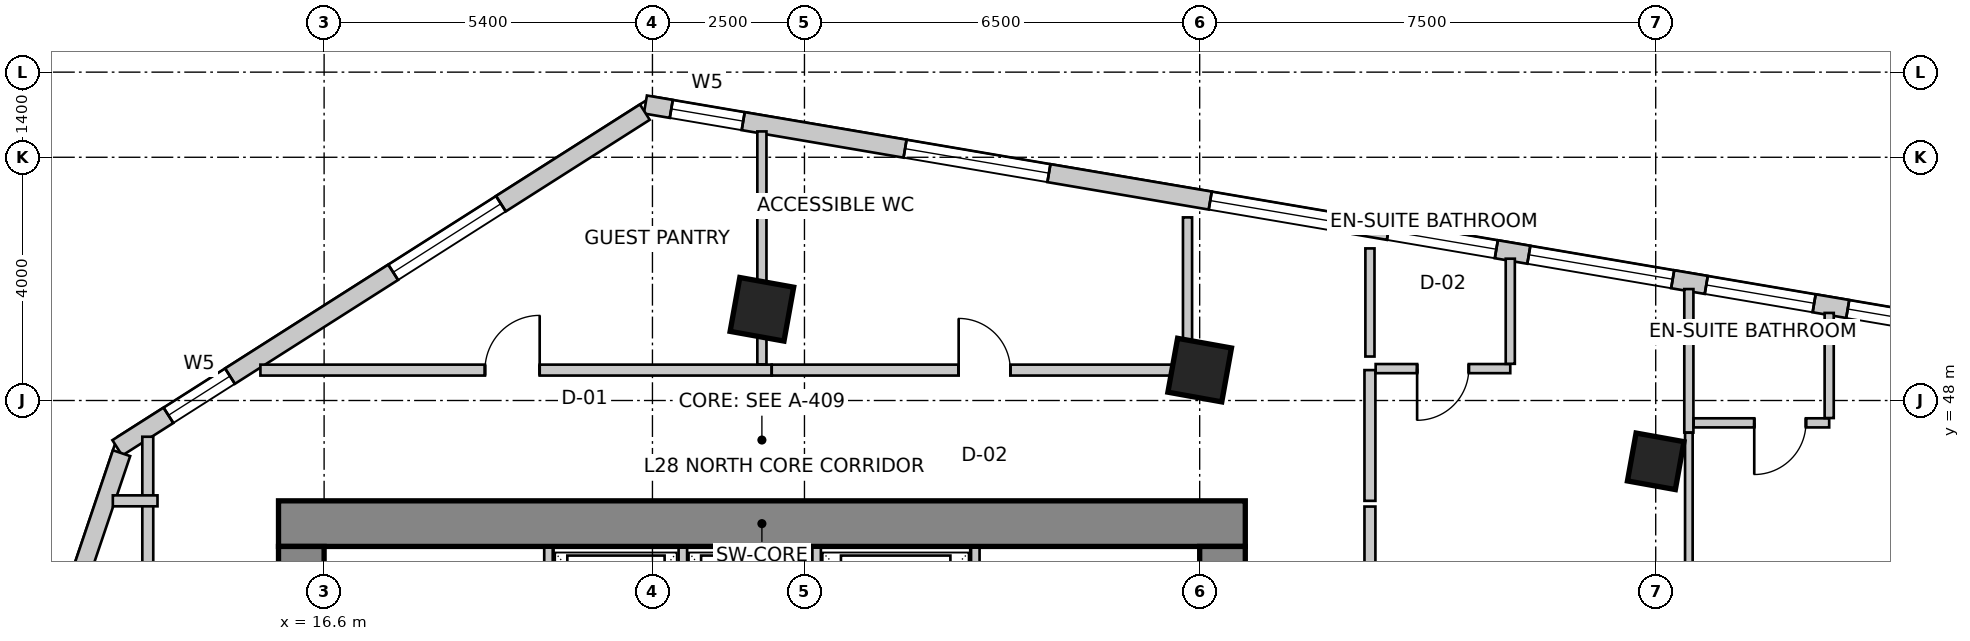
"""IFC4 building model, lengths in metres.
Left out: names, types, materials, properties, quantities, classifications, styles, units other than length and angle.
Written with IfcOpenShell. Run it as: python <this file> out.ifc"""

import sys

from ifc_helpers import new_model, si_unit, direction, frame, frame_2d, origin, origin_2d, place, context, subcontext, project, spatial, rectangle, extrude, source, transform, mapped, element, fill, save


model = new_model("IFC4")
c1 = context("Model", 3, precision=1e-05, world=origin(), true_north=direction((0.0, 1.0)))
c2 = subcontext(c1, "Body", "Model", "MODEL_VIEW")
j1 = project(units=[si_unit("LENGTHUNIT", "METRE"), si_unit("PLANEANGLEUNIT", "RADIAN")], contexts=[c1])
p1 = place(None, origin())
s1 = spatial("IfcSite", under=j1, at=p1, CompositionType="ELEMENT")
p2 = place(p1, origin())
s2 = spatial("IfcBuilding", under=s1, at=p2, CompositionType="ELEMENT")
p3 = place(p2, frame((0.0, 0.0, 117.8)))
s3 = spatial("IfcBuildingStorey", under=s2, at=p3, CompositionType="ELEMENT", Elevation=117.8)
p4 = place(p3, frame((15.85, 45.975, 0.0), z_axis=(0.0, 0.0, 1.0), x_axis=(1.0, 0.0, 0.0)))
e1 = element("IfcWall", 1, at=p4, inside=s3, PredefinedType="SHEAR", context=c2, shape_type="SweptSolid", body=[
    extrude(rectangle(XDim=15.9, YDim=0.75, at=frame_2d((7.95, 0.0))), origin(), (0.0, 0.0, 1.0), 3.6),
])
p5 = place(p3, frame((16.225, 34.2, 0.0), z_axis=(0.0, 0.0, 1.0), x_axis=(0.0, 1.0, 0.0)))
e2 = element("IfcWall", 2, at=p5, inside=s3, PredefinedType="SHEAR", context=c2, shape_type="SweptSolid", body=[
    extrude(rectangle(XDim=11.4, YDim=0.75, at=frame_2d((5.7, 0.0))), origin(), (0.0, 0.0, 1.0), 3.6),
])
m1 = source(origin(), c2, "Body", "SweptSolid", [
    extrude(rectangle(XDim=1.1, YDim=2.15, at=frame_2d((0.55, 1.075))), frame((0.0, 0.385, 0.0), z_axis=(0.0, -1.0, 0.0), x_axis=(1.0, 0.0, 0.0)), (0.0, 0.0, 1.0), 0.77),
])
p6 = place(p5, frame((7.15, 0.0, 0.0)))
e3 = element("IfcOpeningElement", 3, at=p6, cuts=e2, PredefinedType="OPENING", context=c2, shape_type="MappedRepresentation", body=[
    mapped(m1, transform((0.0, 0.0, 0.0), scale=1.0)),
])
p7 = place(p3, frame((31.375, 34.2, 0.0), z_axis=(0.0, 0.0, 1.0), x_axis=(0.0, 1.0, 0.0)))
e4 = element("IfcWall", 4, at=p7, inside=s3, PredefinedType="SHEAR", context=c2, shape_type="SweptSolid", body=[
    extrude(rectangle(XDim=11.4, YDim=0.75, at=frame_2d((5.7, 0.0))), origin(), (0.0, 0.0, 1.0), 3.6),
])
p8 = place(p7, frame((7.35, 0.0, 0.0)))
e5 = element("IfcOpeningElement", 5, at=p8, cuts=e4, PredefinedType="OPENING", context=c2, shape_type="MappedRepresentation", body=[
    mapped(m1, transform((0.0, 0.0, 0.0), scale=1.0)),
])
m2 = source(origin(), c2, "Body", "SweptSolid", [
    extrude(rectangle(XDim=0.9, YDim=0.9, at=origin_2d()), origin(), (0.0, 0.0, 1.0), 3.6),
])
for number, where, z_axis, x_axis in (
    (6, (23.8, 49.5, 0.0), (0.0, 0.0, 1.0), (0.984, -0.177, 0.0)),
    (7, (31.0, 48.5, 0.0), (0.0, 0.0, 1.0), (0.984, -0.177, 0.0)),
):
    element("IfcColumn", number, at=place(p3, frame(where, z_axis=z_axis, x_axis=x_axis)), inside=s3, PredefinedType="COLUMN", context=c2, shape_type="MappedRepresentation", body=[
        mapped(m2, transform((0.0, 0.0, 0.0), scale=1.0)),
    ])
m3 = source(origin(), c2, "Body", "SweptSolid", [
    extrude(rectangle(XDim=0.8, YDim=0.8, at=origin_2d()), origin(), (0.0, 0.0, 1.0), 3.6),
])
p9 = place(p3, frame((38.5, 47.0, 0.0), z_axis=(0.0, 0.0, 1.0), x_axis=(0.984195607969, -0.17708474032, 0.0)))
e8 = element("IfcColumn", 8, at=p9, inside=s3, PredefinedType="COLUMN", context=c2, shape_type="MappedRepresentation", body=[
    mapped(m3, transform((0.0, 0.0, 0.0), scale=1.0)),
])
p10 = place(p3, frame((53.561, 47.48, 0.0), z_axis=(0.0, 0.0, 1.0), x_axis=(-0.985845173895, 0.167658262868, 0.0)))
e9 = element("IfcWall", 9, at=p10, inside=s3, PredefinedType="SOLIDWALL", context=c2, shape_type="SweptSolid", body=[
    extrude(rectangle(XDim=32.132, YDim=0.3, at=frame_2d((16.066, 0.0))), origin(), (0.0, 0.0, 1.0), 3.35),
])
m4 = source(origin(), c2, "Body", "SweptSolid", [
    extrude(rectangle(XDim=2.4, YDim=2.2, at=frame_2d((1.2, 1.1))), frame((0.0, 0.16, 0.0), z_axis=(0.0, -1.0, 0.0), x_axis=(1.0, 0.0, 0.0)), (0.0, 0.0, 1.0), 0.32),
])
p11 = place(p10, frame((0.882, 0.0, 0.85)))
e10 = element("IfcOpeningElement", 10, at=p11, cuts=e9, PredefinedType="OPENING", context=c2, shape_type="MappedRepresentation", body=[
    mapped(m4, transform((0.0, 0.0, 0.0), scale=1.0)),
])
p12 = place(p10, frame((4.354, 0.0, 0.85)))
e11 = element("IfcOpeningElement", 11, at=p12, cuts=e9, PredefinedType="OPENING", context=c2, shape_type="MappedRepresentation", body=[
    mapped(m4, transform((0.0, 0.0, 0.0), scale=1.0)),
])
m5 = source(origin(), c2, "Body", "SweptSolid", [
    extrude(rectangle(XDim=1.8, YDim=2.1, at=frame_2d((0.9, 1.05))), frame((0.0, 0.16, 0.0), z_axis=(0.0, -1.0, 0.0), x_axis=(1.0, 0.0, 0.0)), (0.0, 0.0, 1.0), 0.32),
])
p13 = place(p10, frame((7.314, 0.0, 0.85)))
e12 = element("IfcOpeningElement", 12, at=p13, cuts=e9, PredefinedType="OPENING", context=c2, shape_type="MappedRepresentation", body=[
    mapped(m5, transform((0.0, 0.0, 0.0), scale=1.0)),
])
p14 = place(p10, frame((9.674, 0.0, 0.85)))
e13 = element("IfcOpeningElement", 13, at=p14, cuts=e9, PredefinedType="OPENING", context=c2, shape_type="MappedRepresentation", body=[
    mapped(m4, transform((0.0, 0.0, 0.0), scale=1.0)),
])
p15 = place(p10, frame((12.634, 0.0, 0.85)))
e14 = element("IfcOpeningElement", 14, at=p15, cuts=e9, PredefinedType="OPENING", context=c2, shape_type="MappedRepresentation", body=[
    mapped(m5, transform((0.0, 0.0, 0.0), scale=1.0)),
])
p16 = place(p10, frame((14.994, 0.0, 0.85)))
e15 = element("IfcOpeningElement", 15, at=p16, cuts=e9, PredefinedType="OPENING", context=c2, shape_type="MappedRepresentation", body=[
    mapped(m4, transform((0.0, 0.0, 0.0), scale=1.0)),
])
p17 = place(p10, frame((17.936, 0.0, 0.85)))
e16 = element("IfcOpeningElement", 16, at=p17, cuts=e9, PredefinedType="OPENING", context=c2, shape_type="MappedRepresentation", body=[
    mapped(m5, transform((0.0, 0.0, 0.0), scale=1.0)),
])
p18 = place(p10, frame((20.309, 0.0, 0.85)))
e17 = element("IfcOpeningElement", 17, at=p18, cuts=e9, PredefinedType="OPENING", context=c2, shape_type="MappedRepresentation", body=[
    mapped(m4, transform((0.0, 0.0, 0.0), scale=1.0)),
])
p19 = place(p10, frame((25.4, 0.0, 0.85)))
e18 = element("IfcOpeningElement", 18, at=p19, cuts=e9, PredefinedType="OPENING", context=c2, shape_type="MappedRepresentation", body=[
    mapped(m4, transform((0.0, 0.0, 0.0), scale=1.0)),
])
m6 = source(origin(), c2, "Body", "SweptSolid", [
    extrude(rectangle(XDim=1.2, YDim=1.6, at=frame_2d((0.6, 0.8))), frame((0.0, 0.16, 0.0), z_axis=(0.0, -1.0, 0.0), x_axis=(1.0, 0.0, 0.0)), (0.0, 0.0, 1.0), 0.32),
])
p20 = place(p10, frame((30.5, 0.0, 0.85)))
e19 = element("IfcOpeningElement", 19, at=p20, cuts=e9, PredefinedType="OPENING", context=c2, shape_type="MappedRepresentation", body=[
    mapped(m6, transform((0.0, 0.0, 0.0), scale=1.0)),
])
p21 = place(p3, frame((21.875, 52.742, 0.0), z_axis=(0.0, 0.0, 1.0), x_axis=(-0.843662465249, -0.536873956092, 0.0)))
e20 = element("IfcWall", 20, at=p21, inside=s3, PredefinedType="SOLIDWALL", context=c2, shape_type="SweptSolid", body=[
    extrude(rectangle(XDim=10.284, YDim=0.3, at=frame_2d((5.142, 0.0))), origin(), (0.0, 0.0, 1.0), 3.35),
])
m7 = source(origin(), c2, "Body", "SweptSolid", [
    extrude(rectangle(XDim=2.1, YDim=2.0, at=frame_2d((1.05, 1.0))), frame((0.0, 0.16, 0.0), z_axis=(0.0, -1.0, 0.0), x_axis=(1.0, 0.0, 0.0)), (0.0, 0.0, 1.0), 0.32),
])
p22 = place(p21, frame((2.806, 0.0, 0.85)))
e21 = element("IfcOpeningElement", 21, at=p22, cuts=e20, PredefinedType="OPENING", context=c2, shape_type="MappedRepresentation", body=[
    mapped(m7, transform((0.0, 0.0, 0.0), scale=1.0)),
])
p23 = place(p21, frame((8.087, 0.0, 0.85)))
e22 = element("IfcOpeningElement", 22, at=p23, cuts=e20, PredefinedType="OPENING", context=c2, shape_type="MappedRepresentation", body=[
    mapped(m6, transform((0.0, 0.0, 0.0), scale=1.0)),
])
p24 = place(p3, frame((13.269, 47.134, 0.0), z_axis=(0.0, 0.0, 1.0), x_axis=(-0.319929596295, -0.947441319246, 0.0)))
e23 = element("IfcWall", 23, at=p24, inside=s3, PredefinedType="SOLIDWALL", context=c2, shape_type="SweptSolid", body=[
    extrude(rectangle(XDim=16.134, YDim=0.3, at=frame_2d((8.067, 0.0))), origin(), (0.0, 0.0, 1.0), 3.35),
])
p25 = place(p24, frame((2.276, 0.0, 0.85)))
e24 = element("IfcOpeningElement", 24, at=p25, cuts=e23, PredefinedType="OPENING", context=c2, shape_type="MappedRepresentation", body=[
    mapped(m4, transform((0.0, 0.0, 0.0), scale=1.0)),
])
p26 = place(p24, frame((7.361, 0.0, 0.85)))
e25 = element("IfcOpeningElement", 25, at=p26, cuts=e23, PredefinedType="OPENING", context=c2, shape_type="MappedRepresentation", body=[
    mapped(m7, transform((0.0, 0.0, 0.0), scale=1.0)),
])
p27 = place(p24, frame((12.147, 0.0, 0.85)))
e26 = element("IfcOpeningElement", 26, at=p27, cuts=e23, PredefinedType="OPENING", context=c2, shape_type="MappedRepresentation", body=[
    mapped(m4, transform((0.0, 0.0, 0.0), scale=1.0)),
])
for number, where, z_axis, x_axis in (
    (27, (20.29, 43.28, 0.0), (0.0, 0.0, 1.0), (0.0, 1.0, 0.0)),
    (28, (27.31, 43.28, 0.0), (0.0, 0.0, 1.0), (0.0, 1.0, 0.0)),
):
    element("IfcWall", number, at=place(p3, frame(where, z_axis=z_axis, x_axis=x_axis)), inside=s3, PredefinedType="SOLIDWALL", context=c2, shape_type="SweptSolid", body=[
        extrude(rectangle(XDim=2.3, YDim=0.14, at=frame_2d((1.15, 0.0))), origin(), (0.0, 0.0, 1.0), 3.35),
    ])
for number, where, z_axis, x_axis in (
    (29, (22.5, 43.02, 0.0), (0.0, 0.0, 1.0), (0.0, 1.0, 0.0)),
    (30, (24.7, 43.02, 0.0), (0.0, 0.0, 1.0), (0.0, 1.0, 0.0)),
):
    element("IfcWall", number, at=place(p3, frame(where, z_axis=z_axis, x_axis=x_axis)), inside=s3, PredefinedType="SOLIDWALL", context=c2, shape_type="SweptSolid", body=[
        extrude(rectangle(XDim=2.56, YDim=0.14, at=frame_2d((1.28, 0.0))), origin(), (0.0, 0.0, 1.0), 3.35),
    ])
p28 = place(p3, frame((13.7, 33.544, 0.0), z_axis=(0.0, 0.0, 1.0), x_axis=(0.0, 1.0, 0.0)))
e31 = element("IfcWall", 31, at=p28, inside=s3, PredefinedType="PARTITIONING", context=c2, shape_type="SweptSolid", body=[
    extrude(rectangle(XDim=13.86, YDim=0.18, at=frame_2d((6.93, 0.0))), origin(), (0.0, 0.0, 1.0), 2.492),
])
m8 = source(origin(), c2, "Body", "SweptSolid", [
    extrude(rectangle(XDim=0.9, YDim=2.15, at=frame_2d((0.45, 1.075))), frame((0.0, 0.1, 0.0), z_axis=(0.0, -1.0, 0.0), x_axis=(1.0, 0.0, 0.0)), (0.0, 0.0, 1.0), 0.2),
])
p29 = place(p28, frame((4.253, 0.0, 0.0)))
e32 = element("IfcOpeningElement", 32, at=p29, cuts=e31, PredefinedType="OPENING", context=c2, shape_type="MappedRepresentation", body=[
    mapped(m8, transform((0.0, 0.0, 0.0), scale=1.0)),
])
p30 = place(p3, frame((13.86, 46.35, 0.0), z_axis=(0.0, 0.0, 1.0), x_axis=(-1.0, 0.0, 0.0)))
e33 = element("IfcWall", 33, at=p30, inside=s3, PredefinedType="PARTITIONING", context=c2, shape_type="SweptSolid", body=[
    extrude(rectangle(XDim=0.735, YDim=0.18, at=frame_2d((0.367, 0.0))), origin(), (0.0, 0.0, 1.0), 3.35),
])
p31 = place(p3, frame((15.552, 48.5, 0.0), z_axis=(0.0, 0.0, 1.0), x_axis=(1.0, 0.0, 0.0)))
e34 = element("IfcWall", 34, at=p31, inside=s3, PredefinedType="PARTITIONING", context=c2, shape_type="SweptSolid", body=[
    extrude(rectangle(XDim=8.407, YDim=0.18, at=frame_2d((4.204, 0.0))), origin(), (0.0, 0.0, 1.0), 3.019),
])
p32 = place(p31, frame((3.693, 0.0, 0.0)))
e35 = element("IfcOpeningElement", 35, at=p32, cuts=e34, PredefinedType="OPENING", context=c2, shape_type="MappedRepresentation", body=[
    mapped(m8, transform((0.0, 0.0, 0.0), scale=1.0)),
])
p33 = place(p3, frame((23.962, 48.5, 0.0), z_axis=(0.0, 0.0, 1.0), x_axis=(1.0, 0.0, 0.0)))
e36 = element("IfcWall", 36, at=p33, inside=s3, PredefinedType="PARTITIONING", context=c2, shape_type="SweptSolid", body=[
    extrude(rectangle(XDim=6.998, YDim=0.18, at=frame_2d((3.499, 0.0))), origin(), (0.0, 0.0, 1.0), 2.492),
])
m9 = source(origin(), c2, "Body", "SweptSolid", [
    extrude(rectangle(XDim=0.85, YDim=2.15, at=frame_2d((0.425, 1.075))), frame((0.0, 0.1, 0.0), z_axis=(0.0, -1.0, 0.0), x_axis=(1.0, 0.0, 0.0)), (0.0, 0.0, 1.0), 0.2),
])
p34 = place(p33, frame((3.074, 0.0, 0.0)))
e37 = element("IfcOpeningElement", 37, at=p34, cuts=e36, PredefinedType="OPENING", context=c2, shape_type="MappedRepresentation", body=[
    mapped(m9, transform((0.0, 0.0, 0.0), scale=1.0)),
])
p35 = place(p3, frame((33.8, 48.5, 0.0), z_axis=(0.0, 0.0, 1.0), x_axis=(0.0, -1.0, 0.0)))
e38 = element("IfcWall", 38, at=p35, inside=s3, PredefinedType="PARTITIONING", context=c2, shape_type="SweptSolid", body=[
    extrude(rectangle(XDim=2.15, YDim=0.18, at=frame_2d((1.075, 0.0))), origin(), (0.0, 0.0, 1.0), 2.492),
])
p36 = place(p3, frame((33.8, 46.256, 0.0), z_axis=(0.0, 0.0, 1.0), x_axis=(0.0, -1.0, 0.0)))
e39 = element("IfcWall", 39, at=p36, inside=s3, PredefinedType="PARTITIONING", context=c2, shape_type="SweptSolid", body=[
    extrude(rectangle(XDim=8.416, YDim=0.18, at=frame_2d((4.208, 0.0))), origin(), (0.0, 0.0, 1.0), 2.879),
])
p37 = place(p3, frame((23.8, 52.425, 0.0), z_axis=(0.0, 0.0, 1.0), x_axis=(0.0, -1.0, 0.0)))
e40 = element("IfcWall", 40, at=p37, inside=s3, PredefinedType="PARTITIONING", context=c2, shape_type="SweptSolid", body=[
    extrude(rectangle(XDim=3.831, YDim=0.15, at=frame_2d((1.916, 0.0))), origin(), (0.0, 0.0, 1.0), 2.492),
])
p38 = place(p3, frame((36.108, 48.524, 0.0), z_axis=(0.0, 0.0, 1.0), x_axis=(-1.0, 0.0, 0.0)))
e41 = element("IfcWall", 41, at=p38, inside=s3, PredefinedType="PARTITIONING", context=c2, shape_type="SweptSolid", body=[
    extrude(rectangle(XDim=2.214, YDim=0.15, at=frame_2d((1.107, 0.0))), origin(), (0.0, 0.0, 1.0), 3.35),
])
m10 = source(origin(), c2, "Body", "SweptSolid", [
    extrude(rectangle(XDim=0.85, YDim=2.15, at=frame_2d((0.425, 1.075))), frame((0.0, 0.085, 0.0), z_axis=(0.0, -1.0, 0.0), x_axis=(1.0, 0.0, 0.0)), (0.0, 0.0, 1.0), 0.17),
])
p39 = place(p38, frame((0.682, 0.0, 0.0)))
e42 = element("IfcOpeningElement", 42, at=p39, cuts=e41, PredefinedType="OPENING", context=c2, shape_type="MappedRepresentation", body=[
    mapped(m10, transform((0.0, 0.0, 0.0), scale=1.0)),
])
p40 = place(p3, frame((36.108, 50.332, 0.0), z_axis=(0.0, 0.0, 1.0), x_axis=(0.0, -1.0, 0.0)))
e43 = element("IfcWall", 43, at=p40, inside=s3, PredefinedType="PARTITIONING", context=c2, shape_type="SweptSolid", body=[
    extrude(rectangle(XDim=1.728, YDim=0.15, at=frame_2d((0.864, 0.0))), origin(), (0.0, 0.0, 1.0), 3.35),
])
p41 = place(p3, frame((39.045, 49.833, 0.0), z_axis=(0.0, 0.0, 1.0), x_axis=(0.0, -1.0, 0.0)))
e44 = element("IfcWall", 44, at=p41, inside=s3, PredefinedType="PARTITIONING", context=c2, shape_type="SweptSolid", body=[
    extrude(rectangle(XDim=2.36, YDim=0.15, at=frame_2d((1.18, 0.0))), origin(), (0.0, 0.0, 1.0), 3.35),
])
p42 = place(p3, frame((39.045, 47.47, 0.0), z_axis=(0.0, 0.0, 1.0), x_axis=(0.0, -1.0, 0.0)))
e45 = element("IfcWall", 45, at=p42, inside=s3, PredefinedType="PARTITIONING", context=c2, shape_type="SweptSolid", body=[
    extrude(rectangle(XDim=9.376, YDim=0.125, at=frame_2d((4.688, 0.0))), origin(), (0.0, 0.0, 1.0), 2.492),
])
p43 = place(p3, frame((41.353, 47.633, 0.0), z_axis=(0.0, 0.0, 1.0), x_axis=(-1.0, 0.0, 0.0)))
e46 = element("IfcWall", 46, at=p43, inside=s3, PredefinedType="PARTITIONING", context=c2, shape_type="SweptSolid", body=[
    extrude(rectangle(XDim=2.229, YDim=0.15, at=frame_2d((1.115, 0.0))), origin(), (0.0, 0.0, 1.0), 3.35),
])
p44 = place(p43, frame((0.382, 0.0, 0.0)))
e47 = element("IfcOpeningElement", 47, at=p44, cuts=e46, PredefinedType="OPENING", context=c2, shape_type="MappedRepresentation", body=[
    mapped(m10, transform((0.0, 0.0, 0.0), scale=1.0)),
])
p45 = place(p3, frame((41.353, 49.44, 0.0), z_axis=(0.0, 0.0, 1.0), x_axis=(0.0, -1.0, 0.0)))
e48 = element("IfcWall", 48, at=p45, inside=s3, PredefinedType="PARTITIONING", context=c2, shape_type="SweptSolid", body=[
    extrude(rectangle(XDim=1.729, YDim=0.15, at=frame_2d((0.864, 0.0))), origin(), (0.0, 0.0, 1.0), 3.35),
])
p46 = place(p3, frame((30.8, 51.011, 0.0), z_axis=(0.0, 0.0, 1.0), x_axis=(0.0, -1.0, 0.0)))
e49 = element("IfcWall", 49, at=p46, inside=s3, PredefinedType="PARTITIONING", context=c2, shape_type="SweptSolid", body=[
    extrude(rectangle(XDim=2.292, YDim=0.15, at=frame_2d((1.146, 0.0))), origin(), (0.0, 0.0, 1.0), 3.35),
])
p47 = place(p3, frame((33.8, 48.723, 0.0), z_axis=(0.0, 0.0, 1.0), x_axis=(0.0, 1.0, 0.0)))
e50 = element("IfcWall", 50, at=p47, inside=s3, PredefinedType="PARTITIONING", context=c2, shape_type="SweptSolid", body=[
    extrude(rectangle(XDim=1.778, YDim=0.15, at=frame_2d((0.889, 0.0))), origin(), (0.0, 0.0, 1.0), 3.35),
])
m11 = source(origin(), c2, "Body", "SweptSolid", [
    extrude(rectangle(XDim=2.4, YDim=2.2, at=frame_2d((1.2, 1.1))), frame((0.0, -0.015, 0.0), z_axis=(0.0, -1.0, 0.0), x_axis=(1.0, 0.0, 0.0)), (0.0, 0.0, 1.0), 0.06),
])
p48 = place(p14, origin())
e51 = element("IfcWindow", 51, at=p48, inside=s3, PartitioningType="SINGLE_PANEL", PredefinedType="WINDOW", context=c2, shape_type="MappedRepresentation", body=[
    mapped(m11, transform((0.0, 0.0, 0.0), scale=1.0)),
])
fill(e13, e51)
m12 = source(origin(), c2, "Body", "SweptSolid", [
    extrude(rectangle(XDim=1.8, YDim=2.1, at=frame_2d((0.9, 1.05))), frame((0.0, -0.015, 0.0), z_axis=(0.0, -1.0, 0.0), x_axis=(1.0, 0.0, 0.0)), (0.0, 0.0, 1.0), 0.06),
])
p49 = place(p15, origin())
e52 = element("IfcWindow", 52, at=p49, inside=s3, PartitioningType="SINGLE_PANEL", PredefinedType="WINDOW", context=c2, shape_type="MappedRepresentation", body=[
    mapped(m12, transform((0.0, 0.0, 0.0), scale=1.0)),
])
fill(e14, e52)
p50 = place(p16, origin())
e53 = element("IfcWindow", 53, at=p50, inside=s3, PartitioningType="SINGLE_PANEL", PredefinedType="WINDOW", context=c2, shape_type="MappedRepresentation", body=[
    mapped(m11, transform((0.0, 0.0, 0.0), scale=1.0)),
])
fill(e15, e53)
p51 = place(p17, origin())
e54 = element("IfcWindow", 54, at=p51, inside=s3, PartitioningType="SINGLE_PANEL", PredefinedType="WINDOW", context=c2, shape_type="MappedRepresentation", body=[
    mapped(m12, transform((0.0, 0.0, 0.0), scale=1.0)),
])
fill(e16, e54)
p52 = place(p18, origin())
e55 = element("IfcWindow", 55, at=p52, inside=s3, PartitioningType="SINGLE_PANEL", PredefinedType="WINDOW", context=c2, shape_type="MappedRepresentation", body=[
    mapped(m11, transform((0.0, 0.0, 0.0), scale=1.0)),
])
fill(e17, e55)
p53 = place(p19, origin())
e56 = element("IfcWindow", 56, at=p53, inside=s3, PartitioningType="SINGLE_PANEL", PredefinedType="WINDOW", context=c2, shape_type="MappedRepresentation", body=[
    mapped(m11, transform((0.0, 0.0, 0.0), scale=1.0)),
])
fill(e18, e56)
m13 = source(origin(), c2, "Body", "SweptSolid", [
    extrude(rectangle(XDim=1.2, YDim=1.6, at=frame_2d((0.6, 0.8))), frame((0.0, -0.015, 0.0), z_axis=(0.0, -1.0, 0.0), x_axis=(1.0, 0.0, 0.0)), (0.0, 0.0, 1.0), 0.06),
])
p54 = place(p20, origin())
e57 = element("IfcWindow", 57, at=p54, inside=s3, PartitioningType="SINGLE_PANEL", PredefinedType="WINDOW", context=c2, shape_type="MappedRepresentation", body=[
    mapped(m13, transform((0.0, 0.0, 0.0), scale=1.0)),
])
fill(e19, e57)
m14 = source(origin(), c2, "Body", "SweptSolid", [
    extrude(rectangle(XDim=2.1, YDim=2.0, at=frame_2d((1.05, 1.0))), frame((0.0, -0.015, 0.0), z_axis=(0.0, -1.0, 0.0), x_axis=(1.0, 0.0, 0.0)), (0.0, 0.0, 1.0), 0.06),
])
p55 = place(p22, origin())
e58 = element("IfcWindow", 58, at=p55, inside=s3, PartitioningType="SINGLE_PANEL", PredefinedType="WINDOW", context=c2, shape_type="MappedRepresentation", body=[
    mapped(m14, transform((0.0, 0.0, 0.0), scale=1.0)),
])
fill(e21, e58)
p56 = place(p23, origin())
e59 = element("IfcWindow", 59, at=p56, inside=s3, PartitioningType="SINGLE_PANEL", PredefinedType="WINDOW", context=c2, shape_type="MappedRepresentation", body=[
    mapped(m13, transform((0.0, 0.0, 0.0), scale=1.0)),
])
fill(e22, e59)
m15 = source(origin(), c2, "Body", "SweptSolid", [
    extrude(rectangle(XDim=0.9, YDim=2.15, at=frame_2d((0.45, 1.075))), frame((0.0, 0.025, 0.0), z_axis=(0.0, -1.0, 0.0), x_axis=(1.0, 0.0, 0.0)), (0.0, 0.0, 1.0), 0.05),
])
p57 = place(p32, origin())
e60 = element("IfcDoor", 60, at=p57, inside=s3, OperationType="SINGLE_SWING_RIGHT", PredefinedType="DOOR", context=c2, shape_type="MappedRepresentation", body=[
    mapped(m15, transform((0.0, 0.0, 0.0), scale=1.0)),
])
fill(e35, e60)
m16 = source(origin(), c2, "Body", "SweptSolid", [
    extrude(rectangle(XDim=0.85, YDim=2.15, at=frame_2d((0.425, 1.075))), frame((0.0, 0.025, 0.0), z_axis=(0.0, -1.0, 0.0), x_axis=(1.0, 0.0, 0.0)), (0.0, 0.0, 1.0), 0.05),
])
p58 = place(p34, origin())
e61 = element("IfcDoor", 61, at=p58, inside=s3, OperationType="SINGLE_SWING_LEFT", PredefinedType="DOOR", context=c2, shape_type="MappedRepresentation", body=[
    mapped(m16, transform((0.0, 0.0, 0.0), scale=1.0)),
])
fill(e37, e61)
p59 = place(p39, origin())
e62 = element("IfcDoor", 62, at=p59, inside=s3, OperationType="SINGLE_SWING_RIGHT", PredefinedType="DOOR", context=c2, shape_type="MappedRepresentation", body=[
    mapped(m16, transform((0.0, 0.0, 0.0), scale=1.0)),
])
fill(e42, e62)
p60 = place(p44, origin())
e63 = element("IfcDoor", 63, at=p60, inside=s3, OperationType="SINGLE_SWING_RIGHT", PredefinedType="DOOR", context=c2, shape_type="MappedRepresentation", body=[
    mapped(m16, transform((0.0, 0.0, 0.0), scale=1.0)),
])
fill(e47, e63)
save(model, sys.argv[1])
